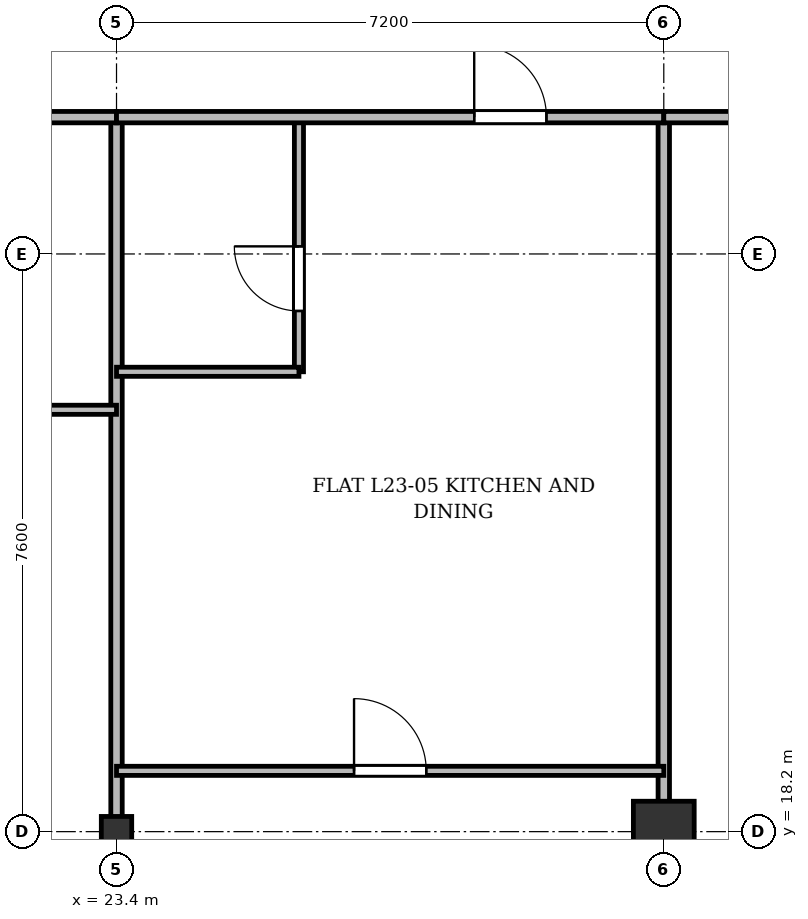
"""IFC4 building model, lengths in metres.
Left out: names, types, materials, properties, quantities, classifications, styles, units other than length and angle.
Written with IfcOpenShell. Run it as: python <this file> out.ifc"""

import sys

from ifc_helpers import new_model, si_unit, direction, frame, frame_2d, origin, origin_2d, place, context, subcontext, project, spatial, rectangle, i_section, extrude, source, transform, mapped, element, fill, save


model = new_model("IFC4")
c1 = context("Model", 3, precision=1e-05, world=origin(), true_north=direction((0.0, 1.0)))
c2 = subcontext(c1, "Body", "Model", "MODEL_VIEW")
j1 = project(units=[si_unit("LENGTHUNIT", "METRE"), si_unit("PLANEANGLEUNIT", "RADIAN")], contexts=[c1])
p1 = place(None, origin())
s1 = spatial("IfcSite", under=j1, at=p1, CompositionType="ELEMENT")
p2 = place(p1, origin())
s2 = spatial("IfcBuilding", under=s1, at=p2, CompositionType="ELEMENT")
p3 = place(p2, frame((0.0, 0.0, 92.5)))
s3 = spatial("IfcBuildingStorey", under=s2, at=p3, CompositionType="ELEMENT", Elevation=92.5)
m1 = source(origin(), c2, "Body", "SweptSolid", [
    extrude(i_section(OverallWidth=0.4, OverallDepth=0.4, WebThickness=0.022, FlangeThickness=0.035, at=origin_2d()), origin(), (0.0, 0.0, 1.0), 3.6),
])
p4 = place(p3, frame((23.4, 18.2, 0.0), z_axis=(0.0, 0.0, 1.0), x_axis=(1.0, 0.0, 0.0)))
e1 = element("IfcColumn", 1, at=p4, inside=s3, PredefinedType="COLUMN", context=c2, shape_type="MappedRepresentation", body=[
    mapped(m1, transform((0.0, 0.0, 0.0), x_axis=(1.0, 0.0, 0.0), y_axis=(0.0, 1.0, 0.0), z_axis=(0.0, 0.0, 1.0), scale=1.0)),
])
m2 = source(origin(), c2, "Body", "SweptSolid", [
    extrude(rectangle(XDim=0.8, YDim=0.8, at=origin_2d()), origin(), (0.0, 0.0, 1.0), 3.6),
])
p5 = place(p3, frame((30.6, 18.2, 0.0), z_axis=(0.0, 0.0, 1.0), x_axis=(1.0, 0.0, 0.0)))
e2 = element("IfcColumn", 2, at=p5, inside=s3, PredefinedType="COLUMN", context=c2, shape_type="MappedRepresentation", body=[
    mapped(m2, transform((0.0, 0.0, 0.0), x_axis=(1.0, 0.0, 0.0), y_axis=(0.0, 1.0, 0.0), z_axis=(0.0, 0.0, 1.0), scale=1.0)),
])
for number, where, z_axis, x_axis in (
    (3, (23.4, 3.145, 0.0), (0.0, 0.0, 1.0), (0.0, 1.0, 0.0)),
    (4, (30.6, 3.145, 0.0), (0.0, 0.0, 1.0), (0.0, 1.0, 0.0)),
):
    element("IfcWall", number, at=place(p3, frame(where, z_axis=z_axis, x_axis=x_axis)), inside=s3, PredefinedType="PARTITIONING", context=c2, shape_type="SweptSolid", body=[
        extrude(rectangle(XDim=24.455, YDim=0.15, at=frame_2d((12.228, 0.0))), origin(), (0.0, 0.0, 1.0), 2.84),
    ])
p6 = place(p3, frame((19.6, 27.6, 0.0), z_axis=(0.0, 0.0, 1.0), x_axis=(1.0, 0.0, 0.0)))
e5 = element("IfcWall", 5, at=p6, inside=s3, PredefinedType="PARTITIONING", context=c2, shape_type="SweptSolid", body=[
    extrude(rectangle(XDim=3.8, YDim=0.15, at=frame_2d((1.9, 0.0))), origin(), (0.0, 0.0, 1.0), 2.84),
])
p7 = place(p6, frame((1.33, 0.0, 0.0)))
e6 = element("IfcOpeningElement", 6, at=p7, cuts=e5, PredefinedType="OPENING", context=c2, shape_type="SweptSolid", body=[
    extrude(rectangle(XDim=0.95, YDim=2.15, at=frame_2d((0.475, 1.075))), frame((0.0, 0.085, 0.0), z_axis=(0.0, -1.0, 0.0), x_axis=(1.0, 0.0, 0.0)), (0.0, 0.0, 1.0), 0.17),
])
p8 = place(p3, frame((19.6, 23.75, 0.0), z_axis=(0.0, 0.0, 1.0), x_axis=(1.0, 0.0, 0.0)))
e7 = element("IfcWall", 7, at=p8, inside=s3, PredefinedType="PARTITIONING", context=c2, shape_type="SweptSolid", body=[
    extrude(rectangle(XDim=3.8, YDim=0.12, at=frame_2d((1.9, 0.0))), origin(), (0.0, 0.0, 1.0), 2.84),
])
p9 = place(p8, frame((1.33, 0.0, 0.0)))
e8 = element("IfcOpeningElement", 8, at=p9, cuts=e7, PredefinedType="OPENING", context=c2, shape_type="SweptSolid", body=[
    extrude(rectangle(XDim=0.95, YDim=2.15, at=frame_2d((0.475, 1.075))), frame((0.0, 0.07, 0.0), z_axis=(0.0, -1.0, 0.0), x_axis=(1.0, 0.0, 0.0)), (0.0, 0.0, 1.0), 0.14),
])
p10 = place(p3, frame((23.4, 19.0, 0.0), z_axis=(0.0, 0.0, 1.0), x_axis=(1.0, 0.0, 0.0)))
e9 = element("IfcWall", 9, at=p10, inside=s3, PredefinedType="PARTITIONING", context=c2, shape_type="SweptSolid", body=[
    extrude(rectangle(XDim=7.2, YDim=0.12, at=frame_2d((3.6, 0.0))), origin(), (0.0, 0.0, 1.0), 2.84),
])
p11 = place(p10, frame((3.125, 0.0, 0.0)))
e10 = element("IfcOpeningElement", 10, at=p11, cuts=e9, PredefinedType="OPENING", context=c2, shape_type="SweptSolid", body=[
    extrude(rectangle(XDim=0.95, YDim=2.15, at=frame_2d((0.475, 1.075))), frame((0.0, 0.07, 0.0), z_axis=(0.0, -1.0, 0.0), x_axis=(1.0, 0.0, 0.0)), (0.0, 0.0, 1.0), 0.14),
])
p12 = place(p3, frame((25.8, 24.25, 0.0), z_axis=(0.0, 0.0, 1.0), x_axis=(0.0, 1.0, 0.0)))
e11 = element("IfcWall", 11, at=p12, inside=s3, PredefinedType="PARTITIONING", context=c2, shape_type="SweptSolid", body=[
    extrude(rectangle(XDim=3.35, YDim=0.12, at=frame_2d((1.675, 0.0))), origin(), (0.0, 0.0, 1.0), 2.99),
])
p13 = place(p12, frame((0.8, 0.0, 0.0)))
e12 = element("IfcOpeningElement", 12, at=p13, cuts=e11, PredefinedType="OPENING", context=c2, shape_type="SweptSolid", body=[
    extrude(rectangle(XDim=0.85, YDim=2.1, at=frame_2d((0.425, 1.05))), frame((0.0, 0.07, 0.0), z_axis=(0.0, -1.0, 0.0), x_axis=(1.0, 0.0, 0.0)), (0.0, 0.0, 1.0), 0.14),
])
p14 = place(p3, frame((23.4, 24.25, 0.0), z_axis=(0.0, 0.0, 1.0), x_axis=(1.0, 0.0, 0.0)))
e13 = element("IfcWall", 13, at=p14, inside=s3, PredefinedType="PARTITIONING", context=c2, shape_type="SweptSolid", body=[
    extrude(rectangle(XDim=2.4, YDim=0.12, at=frame_2d((1.2, 0.0))), origin(), (0.0, 0.0, 1.0), 2.84),
])
p15 = place(p3, frame((23.4, 27.6, 0.0), z_axis=(0.0, 0.0, 1.0), x_axis=(1.0, 0.0, 0.0)))
e14 = element("IfcWall", 14, at=p15, inside=s3, PredefinedType="PARTITIONING", context=c2, shape_type="SweptSolid", body=[
    extrude(rectangle(XDim=7.2, YDim=0.15, at=frame_2d((3.6, 0.0))), origin(), (0.0, 0.0, 1.0), 2.84),
])
p16 = place(p15, frame((4.706, 0.0, 0.0)))
e15 = element("IfcOpeningElement", 15, at=p16, cuts=e14, PredefinedType="OPENING", context=c2, shape_type="SweptSolid", body=[
    extrude(rectangle(XDim=0.95, YDim=2.15, at=frame_2d((0.475, 1.075))), frame((0.0, 0.085, 0.0), z_axis=(0.0, -1.0, 0.0), x_axis=(1.0, 0.0, 0.0)), (0.0, 0.0, 1.0), 0.17),
])
p17 = place(p3, frame((30.6, 27.6, 0.0), z_axis=(0.0, 0.0, 1.0), x_axis=(1.0, 0.0, 0.0)))
e16 = element("IfcWall", 16, at=p17, inside=s3, PredefinedType="PARTITIONING", context=c2, shape_type="SweptSolid", body=[
    extrude(rectangle(XDim=13.2, YDim=0.15, at=frame_2d((6.6, 0.0))), origin(), (0.0, 0.0, 1.0), 2.84),
])
p18 = place(p17, frame((5.8, 0.0, 0.0)))
e17 = element("IfcOpeningElement", 17, at=p18, cuts=e16, PredefinedType="OPENING", context=c2, shape_type="SweptSolid", body=[
    extrude(rectangle(XDim=1.6, YDim=2.2, at=frame_2d((0.8, 1.1))), frame((0.0, 0.085, 0.0), z_axis=(0.0, -1.0, 0.0), x_axis=(1.0, 0.0, 0.0)), (0.0, 0.0, 1.0), 0.17),
])
m3 = source(origin(), c2, "Body", "SweptSolid", [
    extrude(rectangle(XDim=0.95, YDim=2.15, at=frame_2d((0.475, 1.075))), frame((0.0, 0.025, 0.0), z_axis=(0.0, -1.0, 0.0), x_axis=(1.0, 0.0, 0.0)), (0.0, 0.0, 1.0), 0.05),
])
p19 = place(p11, origin())
e18 = element("IfcDoor", 18, at=p19, inside=s3, OperationType="SINGLE_SWING_LEFT", PredefinedType="DOOR", context=c2, shape_type="MappedRepresentation", body=[
    mapped(m3, transform((0.0, 0.0, 0.0), x_axis=(1.0, 0.0, 0.0), y_axis=(0.0, 1.0, 0.0), z_axis=(0.0, 0.0, 1.0), scale=1.0)),
])
fill(e10, e18)
m4 = source(origin(), c2, "Body", "SweptSolid", [
    extrude(rectangle(XDim=0.85, YDim=2.1, at=frame_2d((0.425, 1.05))), frame((0.0, 0.025, 0.0), z_axis=(0.0, -1.0, 0.0), x_axis=(1.0, 0.0, 0.0)), (0.0, 0.0, 1.0), 0.05),
])
p20 = place(p13, origin())
e19 = element("IfcDoor", 19, at=p20, inside=s3, OperationType="SINGLE_SWING_RIGHT", PredefinedType="DOOR", context=c2, shape_type="MappedRepresentation", body=[
    mapped(m4, transform((0.0, 0.0, 0.0), x_axis=(1.0, 0.0, 0.0), y_axis=(0.0, 1.0, 0.0), z_axis=(0.0, 0.0, 1.0), scale=1.0)),
])
fill(e12, e19)
p21 = place(p16, origin())
e20 = element("IfcDoor", 20, at=p21, inside=s3, OperationType="SINGLE_SWING_LEFT", PredefinedType="DOOR", context=c2, shape_type="MappedRepresentation", body=[
    mapped(m3, transform((0.0, 0.0, 0.0), x_axis=(1.0, 0.0, 0.0), y_axis=(0.0, 1.0, 0.0), z_axis=(0.0, 0.0, 1.0), scale=1.0)),
])
fill(e15, e20)
save(model, sys.argv[1])
